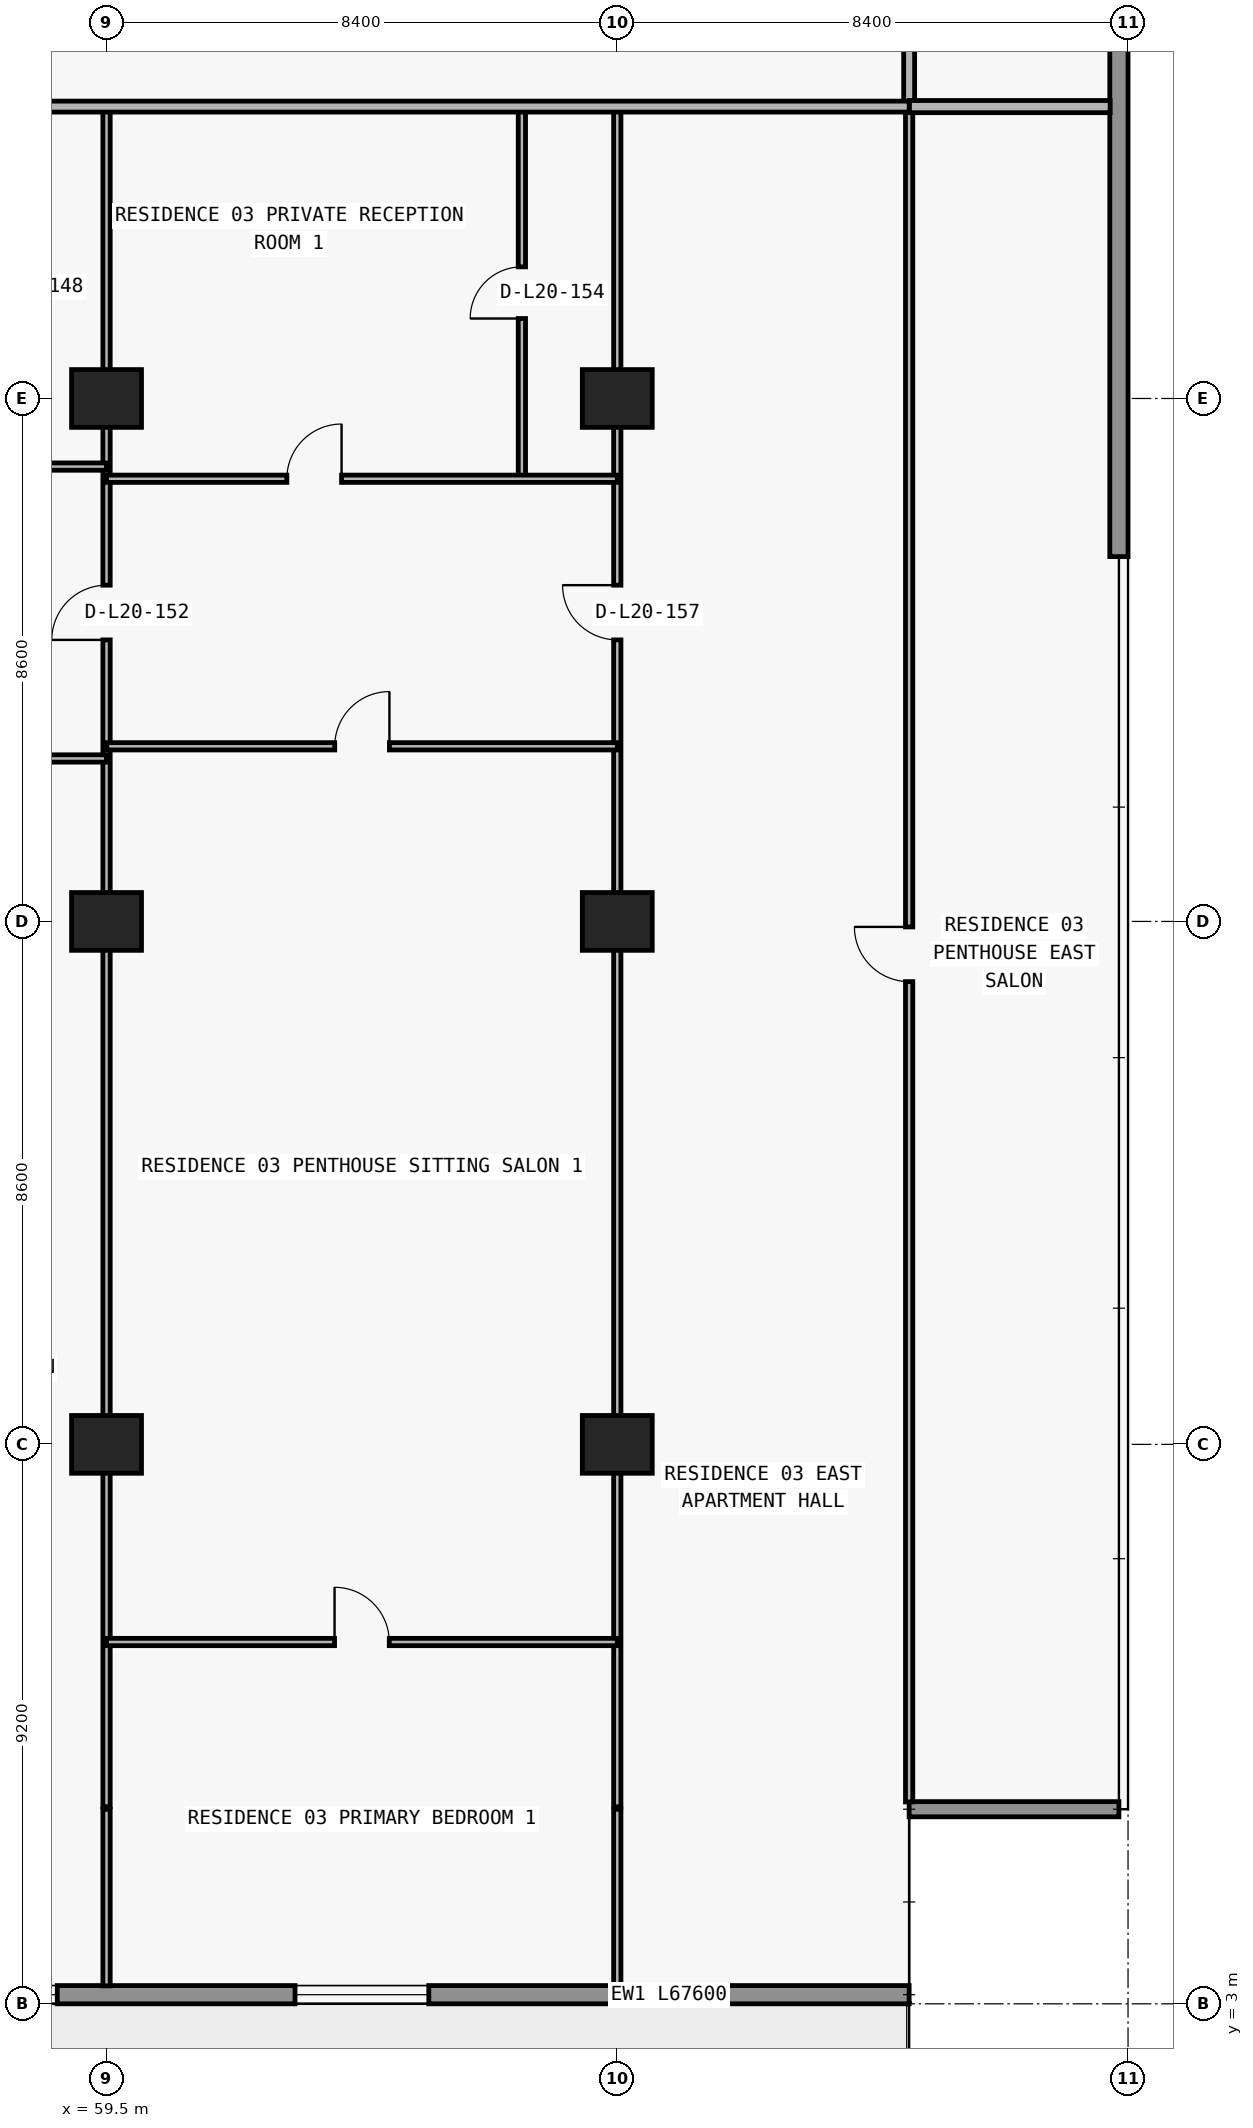
"""IFC4 building model, lengths in metres.
Left out: names, types, materials, properties, quantities, classifications, styles, units other than length and angle.
Written with IfcOpenShell. Run it as: python <this file> out.ifc"""

import sys

from ifc_helpers import new_model, si_unit, direction, frame, frame_2d, origin, origin_2d, place, context, subcontext, project, spatial, rectangle, extrude, element, fill, save


model = new_model("IFC4")
c1 = context("Model", 3, precision=1e-05, world=origin(), true_north=direction((0.0, 1.0)))
c2 = subcontext(c1, "Body", "Model", "MODEL_VIEW")
j1 = project(units=[si_unit("LENGTHUNIT", "METRE"), si_unit("PLANEANGLEUNIT", "RADIAN")], contexts=[c1])
p1 = place(None, origin())
s1 = spatial("IfcSite", under=j1, at=p1, CompositionType="ELEMENT")
p2 = place(p1, origin())
s2 = spatial("IfcBuilding", under=s1, at=p2, CompositionType="ELEMENT")
p3 = place(p2, frame((0.0, 0.0, 76.2)))
s3 = spatial("IfcBuildingStorey", under=s2, at=p3, CompositionType="ELEMENT", Elevation=76.2)
for number, where, z_axis, x_axis in (
    (1, (59.5, 12.2, 0.0), (0.0, 0.0, 1.0), (1.0, 0.0, 0.0)),
    (2, (67.9, 12.2, 0.0), (0.0, 0.0, 1.0), (1.0, 0.0, 0.0)),
    (3, (59.5, 20.8, 0.0), (0.0, 0.0, 1.0), (1.0, 0.0, 0.0)),
    (4, (67.9, 20.8, 0.0), (0.0, 0.0, 1.0), (1.0, 0.0, 0.0)),
    (5, (59.5, 29.4, 0.0), (0.0, 0.0, 1.0), (1.0, 0.0, 0.0)),
    (6, (67.9, 29.4, 0.0), (0.0, 0.0, 1.0), (1.0, 0.0, 0.0)),
):
    element("IfcColumn", number, at=place(p3, frame(where, z_axis=z_axis, x_axis=x_axis)), inside=s3, PredefinedType="COLUMN", context=c2, shape_type="SweptSolid", body=[
        extrude(rectangle(XDim=1.15, YDim=0.95, at=origin_2d()), origin(), (0.0, 0.0, 1.0), 3.0),
    ])
p4 = place(p3, frame((72.7, 3.15, 0.0), z_axis=(0.0, 0.0, 1.0), x_axis=(-1.0, 0.0, 0.0)))
e7 = element("IfcWall", 7, at=p4, inside=s3, PredefinedType="STANDARD", context=c2, shape_type="SweptSolid", body=[
    extrude(rectangle(XDim=67.6, YDim=0.3, at=frame_2d((33.8, 0.0))), origin(), (0.0, 0.0, 1.0), 3.0),
])
p5 = place(p4, frame((59.89, 0.0, 0.0)))
e8 = element("IfcOpeningElement", 8, at=p5, cuts=e7, PredefinedType="OPENING", context=c2, shape_type="SweptSolid", body=[
    extrude(rectangle(XDim=2.0, YDim=2.3, at=frame_2d((1.0, 1.15))), frame((0.0, 0.16, 0.0), z_axis=(0.0, -1.0, 0.0), x_axis=(1.0, 0.0, 0.0)), (0.0, 0.0, 1.0), 0.32),
])
p6 = place(p4, frame((55.21, 0.0, 0.65)))
e9 = element("IfcOpeningElement", 9, at=p6, cuts=e7, PredefinedType="OPENING", context=c2, shape_type="SweptSolid", body=[
    extrude(rectangle(XDim=2.6, YDim=1.85, at=frame_2d((1.3, 0.925))), frame((0.0, 0.16, 0.0), z_axis=(0.0, -1.0, 0.0), x_axis=(1.0, 0.0, 0.0)), (0.0, 0.0, 1.0), 0.32),
])
p7 = place(p4, frame((49.1, 0.0, 0.85)))
e10 = element("IfcOpeningElement", 10, at=p7, cuts=e7, PredefinedType="OPENING", context=c2, shape_type="SweptSolid", body=[
    extrude(rectangle(XDim=2.2, YDim=1.55, at=frame_2d((1.1, 0.775))), frame((0.0, 0.16, 0.0), z_axis=(0.0, -1.0, 0.0), x_axis=(1.0, 0.0, 0.0)), (0.0, 0.0, 1.0), 0.32),
])
p8 = place(p4, frame((43.09, 0.0, 0.0)))
e11 = element("IfcOpeningElement", 11, at=p8, cuts=e7, PredefinedType="OPENING", context=c2, shape_type="SweptSolid", body=[
    extrude(rectangle(XDim=2.0, YDim=2.3, at=frame_2d((1.0, 1.15))), frame((0.0, 0.16, 0.0), z_axis=(0.0, -1.0, 0.0), x_axis=(1.0, 0.0, 0.0)), (0.0, 0.0, 1.0), 0.32),
])
p9 = place(p4, frame((38.41, 0.0, 0.65)))
e12 = element("IfcOpeningElement", 12, at=p9, cuts=e7, PredefinedType="OPENING", context=c2, shape_type="SweptSolid", body=[
    extrude(rectangle(XDim=2.6, YDim=1.85, at=frame_2d((1.3, 0.925))), frame((0.0, 0.16, 0.0), z_axis=(0.0, -1.0, 0.0), x_axis=(1.0, 0.0, 0.0)), (0.0, 0.0, 1.0), 0.32),
])
p10 = place(p4, frame((32.7, 0.0, 0.85)))
e13 = element("IfcOpeningElement", 13, at=p10, cuts=e7, PredefinedType="OPENING", context=c2, shape_type="SweptSolid", body=[
    extrude(rectangle(XDim=2.2, YDim=1.55, at=frame_2d((1.1, 0.775))), frame((0.0, 0.16, 0.0), z_axis=(0.0, -1.0, 0.0), x_axis=(1.0, 0.0, 0.0)), (0.0, 0.0, 1.0), 0.32),
])
p11 = place(p4, frame((24.7, 0.0, 0.85)))
e14 = element("IfcOpeningElement", 14, at=p11, cuts=e7, PredefinedType="OPENING", context=c2, shape_type="SweptSolid", body=[
    extrude(rectangle(XDim=2.2, YDim=1.55, at=frame_2d((1.1, 0.775))), frame((0.0, 0.16, 0.0), z_axis=(0.0, -1.0, 0.0), x_axis=(1.0, 0.0, 0.0)), (0.0, 0.0, 1.0), 0.32),
])
p12 = place(p4, frame((18.69, 0.0, 0.0)))
e15 = element("IfcOpeningElement", 15, at=p12, cuts=e7, PredefinedType="OPENING", context=c2, shape_type="SweptSolid", body=[
    extrude(rectangle(XDim=2.0, YDim=2.3, at=frame_2d((1.0, 1.15))), frame((0.0, 0.16, 0.0), z_axis=(0.0, -1.0, 0.0), x_axis=(1.0, 0.0, 0.0)), (0.0, 0.0, 1.0), 0.32),
])
p13 = place(p4, frame((14.01, 0.0, 0.65)))
e16 = element("IfcOpeningElement", 16, at=p13, cuts=e7, PredefinedType="OPENING", context=c2, shape_type="SweptSolid", body=[
    extrude(rectangle(XDim=2.6, YDim=1.85, at=frame_2d((1.3, 0.925))), frame((0.0, 0.16, 0.0), z_axis=(0.0, -1.0, 0.0), x_axis=(1.0, 0.0, 0.0)), (0.0, 0.0, 1.0), 0.32),
])
p14 = place(p4, frame((7.9, 0.0, 0.85)))
e17 = element("IfcOpeningElement", 17, at=p14, cuts=e7, PredefinedType="OPENING", context=c2, shape_type="SweptSolid", body=[
    extrude(rectangle(XDim=2.2, YDim=1.55, at=frame_2d((1.1, 0.775))), frame((0.0, 0.16, 0.0), z_axis=(0.0, -1.0, 0.0), x_axis=(1.0, 0.0, 0.0)), (0.0, 0.0, 1.0), 0.32),
])
p15 = place(p3, frame((72.7, 6.2, 0.0), z_axis=(0.0, 0.0, 1.0), x_axis=(1.0, 0.0, 0.0)))
e18 = element("IfcWall", 18, at=p15, inside=s3, PredefinedType="ELEMENTEDWALL", context=c2, shape_type="SweptSolid", body=[
    extrude(rectangle(XDim=3.45, YDim=0.25, at=frame_2d((1.725, 0.0))), origin(), (0.0, 0.0, 1.0), 3.0),
])
p16 = place(p3, frame((76.15, 47.4, 0.0), z_axis=(0.0, 0.0, 1.0), x_axis=(0.0, -1.0, 0.0)))
e19 = element("IfcWall", 19, at=p16, inside=s3, PredefinedType="STANDARD", context=c2, shape_type="SweptSolid", body=[
    extrude(rectangle(XDim=20.6, YDim=0.3, at=frame_2d((10.3, 0.0))), origin(), (0.0, 0.0, 1.0), 3.0),
])
p17 = place(p3, frame((59.5, 3.295, 0.0), z_axis=(0.0, 0.0, 1.0), x_axis=(0.0, 1.0, 0.0)))
e20 = element("IfcWall", 20, at=p17, inside=s3, PredefinedType="PARTITIONING", context=c2, shape_type="SweptSolid", body=[
    extrude(rectangle(XDim=2.905, YDim=0.12, at=frame_2d((1.453, 0.0))), origin(), (0.0, 0.0, 1.0), 3.0),
])
p18 = place(p3, frame((59.5, 6.24, 0.0), z_axis=(0.0, 0.0, 1.0), x_axis=(0.0, 1.0, 0.0)))
e21 = element("IfcWall", 21, at=p18, inside=s3, PredefinedType="PARTITIONING", context=c2, shape_type="SweptSolid", body=[
    extrude(rectangle(XDim=27.96, YDim=0.12, at=frame_2d((13.98, 0.0))), origin(), (0.0, 0.0, 1.0), 2.06),
])
p19 = place(p18, frame((19.19, 0.0, 0.0)))
e22 = element("IfcOpeningElement", 22, at=p19, cuts=e21, PredefinedType="OPENING", context=c2, shape_type="SweptSolid", body=[
    extrude(rectangle(XDim=0.9, YDim=2.01, at=frame_2d((0.45, 1.005))), frame((0.0, 0.07, 0.0), z_axis=(0.0, -1.0, 0.0), x_axis=(1.0, 0.0, 0.0)), (0.0, 0.0, 1.0), 0.14),
])
p20 = place(p3, frame((66.331, 28.08, 0.0), z_axis=(0.0, 0.0, 1.0), x_axis=(0.0, 1.0, 0.0)))
e23 = element("IfcWall", 23, at=p20, inside=s3, PredefinedType="PARTITIONING", context=c2, shape_type="SweptSolid", body=[
    extrude(rectangle(XDim=6.12, YDim=0.12, at=frame_2d((3.06, 0.0))), origin(), (0.0, 0.0, 1.0), 3.0),
])
p21 = place(p20, frame((2.635, 0.0, 0.0)))
e24 = element("IfcOpeningElement", 24, at=p21, cuts=e23, PredefinedType="OPENING", context=c2, shape_type="SweptSolid", body=[
    extrude(rectangle(XDim=0.85, YDim=2.1, at=frame_2d((0.425, 1.05))), frame((0.0, 0.07, 0.0), z_axis=(0.0, -1.0, 0.0), x_axis=(1.0, 0.0, 0.0)), (0.0, 0.0, 1.0), 0.14),
])
p22 = place(p3, frame((67.9, 3.295, 0.0), z_axis=(0.0, 0.0, 1.0), x_axis=(0.0, 1.0, 0.0)))
e25 = element("IfcWall", 25, at=p22, inside=s3, PredefinedType="PARTITIONING", context=c2, shape_type="SweptSolid", body=[
    extrude(rectangle(XDim=2.905, YDim=0.12, at=frame_2d((1.453, 0.0))), origin(), (0.0, 0.0, 1.0), 3.0),
])
p23 = place(p3, frame((67.9, 6.24, 0.0), z_axis=(0.0, 0.0, 1.0), x_axis=(0.0, 1.0, 0.0)))
e26 = element("IfcWall", 26, at=p23, inside=s3, PredefinedType="PARTITIONING", context=c2, shape_type="SweptSolid", body=[
    extrude(rectangle(XDim=27.96, YDim=0.12, at=frame_2d((13.98, 0.0))), origin(), (0.0, 0.0, 1.0), 2.06),
])
p24 = place(p23, frame((19.19, 0.0, 0.0)))
e27 = element("IfcOpeningElement", 27, at=p24, cuts=e26, PredefinedType="OPENING", context=c2, shape_type="SweptSolid", body=[
    extrude(rectangle(XDim=0.9, YDim=2.01, at=frame_2d((0.45, 1.005))), frame((0.0, 0.07, 0.0), z_axis=(0.0, -1.0, 0.0), x_axis=(1.0, 0.0, 0.0)), (0.0, 0.0, 1.0), 0.14),
])
p25 = place(p3, frame((72.7, 6.32, 0.0), z_axis=(0.0, 0.0, 1.0), x_axis=(0.0, 1.0, 0.0)))
e28 = element("IfcWall", 28, at=p25, inside=s3, PredefinedType="PARTITIONING", context=c2, shape_type="SweptSolid", body=[
    extrude(rectangle(XDim=27.88, YDim=0.12, at=frame_2d((13.94, 0.0))), origin(), (0.0, 0.0, 1.0), 3.0),
])
p26 = place(p25, frame((13.49, 0.0, 0.0)))
e29 = element("IfcOpeningElement", 29, at=p26, cuts=e28, PredefinedType="OPENING", context=c2, shape_type="SweptSolid", body=[
    extrude(rectangle(XDim=0.9, YDim=2.15, at=frame_2d((0.45, 1.075))), frame((0.0, 0.07, 0.0), z_axis=(0.0, -1.0, 0.0), x_axis=(1.0, 0.0, 0.0)), (0.0, 0.0, 1.0), 0.14),
])
p27 = place(p3, frame((72.7, 34.205, 0.0), z_axis=(0.0, 0.0, 1.0), x_axis=(0.0, 1.0, 0.0)))
e30 = element("IfcWall", 30, at=p27, inside=s3, PredefinedType="PARTITIONING", context=c2, shape_type="SweptSolid", body=[
    extrude(rectangle(XDim=2.695, YDim=0.18, at=frame_2d((1.347, 0.0))), origin(), (0.0, 0.0, 1.0), 3.0),
])
p28 = place(p3, frame((59.5, 8.95, 0.0), z_axis=(0.0, 0.0, 1.0), x_axis=(1.0, 0.0, 0.0)))
e31 = element("IfcWall", 31, at=p28, inside=s3, PredefinedType="PARTITIONING", context=c2, shape_type="SweptSolid", body=[
    extrude(rectangle(XDim=8.4, YDim=0.12, at=frame_2d((4.2, 0.0))), origin(), (0.0, 0.0, 1.0), 3.0),
])
p29 = place(p28, frame((3.75, 0.0, 0.0)))
e32 = element("IfcOpeningElement", 32, at=p29, cuts=e31, PredefinedType="OPENING", context=c2, shape_type="SweptSolid", body=[
    extrude(rectangle(XDim=0.9, YDim=2.15, at=frame_2d((0.45, 1.075))), frame((0.0, 0.07, 0.0), z_axis=(0.0, -1.0, 0.0), x_axis=(1.0, 0.0, 0.0)), (0.0, 0.0, 1.0), 0.14),
])
p30 = place(p3, frame((51.37, 23.48, 0.0), z_axis=(0.0, 0.0, 1.0), x_axis=(1.0, 0.0, 0.0)))
e33 = element("IfcWall", 33, at=p30, inside=s3, PredefinedType="PARTITIONING", context=c2, shape_type="SweptSolid", body=[
    extrude(rectangle(XDim=8.13, YDim=0.12, at=frame_2d((4.065, 0.0))), origin(), (0.0, 0.0, 1.0), 3.0),
])
p31 = place(p30, frame((1.305, 0.0, 0.0)))
e34 = element("IfcOpeningElement", 34, at=p31, cuts=e33, PredefinedType="OPENING", context=c2, shape_type="SweptSolid", body=[
    extrude(rectangle(XDim=0.9, YDim=2.15, at=frame_2d((0.45, 1.075))), frame((0.0, 0.07, 0.0), z_axis=(0.0, -1.0, 0.0), x_axis=(1.0, 0.0, 0.0)), (0.0, 0.0, 1.0), 0.14),
])
p32 = place(p3, frame((59.505, 23.68, 0.0), z_axis=(0.0, 0.0, 1.0), x_axis=(1.0, 0.0, 0.0)))
e35 = element("IfcWall", 35, at=p32, inside=s3, PredefinedType="PARTITIONING", context=c2, shape_type="SweptSolid", body=[
    extrude(rectangle(XDim=8.395, YDim=0.12, at=frame_2d((4.198, 0.0))), origin(), (0.0, 0.0, 1.0), 3.0),
])
p33 = place(p32, frame((3.748, 0.0, 0.0)))
e36 = element("IfcOpeningElement", 36, at=p33, cuts=e35, PredefinedType="OPENING", context=c2, shape_type="SweptSolid", body=[
    extrude(rectangle(XDim=0.9, YDim=2.15, at=frame_2d((0.45, 1.075))), frame((0.0, 0.07, 0.0), z_axis=(0.0, -1.0, 0.0), x_axis=(1.0, 0.0, 0.0)), (0.0, 0.0, 1.0), 0.14),
])
p34 = place(p3, frame((59.5, 28.08, 0.0), z_axis=(0.0, 0.0, 1.0), x_axis=(1.0, 0.0, 0.0)))
e37 = element("IfcWall", 37, at=p34, inside=s3, PredefinedType="PARTITIONING", context=c2, shape_type="SweptSolid", body=[
    extrude(rectangle(XDim=8.4, YDim=0.12, at=frame_2d((4.2, 0.0))), origin(), (0.0, 0.0, 1.0), 3.0),
])
p35 = place(p34, frame((2.966, 0.0, 0.0)))
e38 = element("IfcOpeningElement", 38, at=p35, cuts=e37, PredefinedType="OPENING", context=c2, shape_type="SweptSolid", body=[
    extrude(rectangle(XDim=0.9, YDim=2.15, at=frame_2d((0.45, 1.075))), frame((0.0, 0.07, 0.0), z_axis=(0.0, -1.0, 0.0), x_axis=(1.0, 0.0, 0.0)), (0.0, 0.0, 1.0), 0.14),
])
p36 = place(p3, frame((51.37, 28.28, 0.0), z_axis=(0.0, 0.0, 1.0), x_axis=(1.0, 0.0, 0.0)))
e39 = element("IfcWall", 39, at=p36, inside=s3, PredefinedType="PARTITIONING", context=c2, shape_type="SweptSolid", body=[
    extrude(rectangle(XDim=8.13, YDim=0.12, at=frame_2d((4.065, 0.0))), origin(), (0.0, 0.0, 1.0), 3.0),
])
p37 = place(p36, frame((1.305, 0.0, 0.0)))
e40 = element("IfcOpeningElement", 40, at=p37, cuts=e39, PredefinedType="OPENING", context=c2, shape_type="SweptSolid", body=[
    extrude(rectangle(XDim=0.9, YDim=2.15, at=frame_2d((0.45, 1.075))), frame((0.0, 0.07, 0.0), z_axis=(0.0, -1.0, 0.0), x_axis=(1.0, 0.0, 0.0)), (0.0, 0.0, 1.0), 0.14),
])
p38 = place(p3, frame((5.105, 34.2, 0.0), z_axis=(0.0, 0.0, 1.0), x_axis=(1.0, 0.0, 0.0)))
e41 = element("IfcWall", 41, at=p38, inside=s3, PredefinedType="PARTITIONING", context=c2, shape_type="SweptSolid", body=[
    extrude(rectangle(XDim=67.595, YDim=0.18, at=frame_2d((33.797, 0.0))), origin(), (0.0, 0.0, 1.0), 3.0),
])
p39 = place(p38, frame((7.639, 0.0, 0.0)))
e42 = element("IfcOpeningElement", 42, at=p39, cuts=e41, PredefinedType="OPENING", context=c2, shape_type="SweptSolid", body=[
    extrude(rectangle(XDim=1.0, YDim=2.2, at=frame_2d((0.5, 1.1))), frame((0.0, 0.1, 0.0), z_axis=(0.0, -1.0, 0.0), x_axis=(1.0, 0.0, 0.0)), (0.0, 0.0, 1.0), 0.2),
])
p40 = place(p38, frame((24.423, 0.0, 0.0)))
e43 = element("IfcOpeningElement", 43, at=p40, cuts=e41, PredefinedType="OPENING", context=c2, shape_type="SweptSolid", body=[
    extrude(rectangle(XDim=1.0, YDim=2.2, at=frame_2d((0.5, 1.1))), frame((0.0, 0.1, 0.0), z_axis=(0.0, -1.0, 0.0), x_axis=(1.0, 0.0, 0.0)), (0.0, 0.0, 1.0), 0.2),
])
p41 = place(p38, frame((48.825, 0.0, 0.0)))
e44 = element("IfcOpeningElement", 44, at=p41, cuts=e41, PredefinedType="OPENING", context=c2, shape_type="SweptSolid", body=[
    extrude(rectangle(XDim=1.0, YDim=2.2, at=frame_2d((0.5, 1.1))), frame((0.0, 0.1, 0.0), z_axis=(0.0, -1.0, 0.0), x_axis=(1.0, 0.0, 0.0)), (0.0, 0.0, 1.0), 0.2),
])
p42 = place(p3, frame((72.705, 34.2, 0.0), z_axis=(0.0, 0.0, 1.0), x_axis=(1.0, 0.0, 0.0)))
e45 = element("IfcWall", 45, at=p42, inside=s3, PredefinedType="PARTITIONING", context=c2, shape_type="SweptSolid", body=[
    extrude(rectangle(XDim=3.3, YDim=0.2, at=frame_2d((1.65, 0.0))), origin(), (0.0, 0.0, 1.0), 3.0),
])
p43 = place(p13, origin())
e46 = element("IfcWindow", 46, at=p43, inside=s3, PartitioningType="SINGLE_PANEL", PredefinedType="WINDOW", context=c2, shape_type="SweptSolid", body=[
    extrude(rectangle(XDim=2.6, YDim=1.85, at=frame_2d((1.3, 0.925))), frame((0.0, 0.03, 0.0), z_axis=(0.0, -1.0, 0.0), x_axis=(1.0, 0.0, 0.0)), (0.0, 0.0, 1.0), 0.06),
])
fill(e16, e46)
p44 = place(p14, origin())
e47 = element("IfcWindow", 47, at=p44, inside=s3, PartitioningType="SINGLE_PANEL", PredefinedType="WINDOW", context=c2, shape_type="SweptSolid", body=[
    extrude(rectangle(XDim=2.2, YDim=1.55, at=frame_2d((1.1, 0.775))), frame((0.0, 0.03, 0.0), z_axis=(0.0, -1.0, 0.0), x_axis=(1.0, 0.0, 0.0)), (0.0, 0.0, 1.0), 0.06),
])
fill(e17, e47)
p45 = place(p19, origin())
e48 = element("IfcDoor", 48, at=p45, inside=s3, OperationType="SINGLE_SWING_LEFT", PredefinedType="DOOR", context=c2, shape_type="SweptSolid", body=[
    extrude(rectangle(XDim=0.9, YDim=2.01, at=frame_2d((0.45, 1.005))), frame((0.0, 0.025, 0.0), z_axis=(0.0, -1.0, 0.0), x_axis=(1.0, 0.0, 0.0)), (0.0, 0.0, 1.0), 0.05),
])
fill(e22, e48)
p46 = place(p35, origin())
e49 = element("IfcDoor", 49, at=p46, inside=s3, OperationType="SINGLE_SWING_RIGHT", PredefinedType="DOOR", context=c2, shape_type="SweptSolid", body=[
    extrude(rectangle(XDim=0.9, YDim=2.15, at=frame_2d((0.45, 1.075))), frame((0.0, 0.025, 0.0), z_axis=(0.0, -1.0, 0.0), x_axis=(1.0, 0.0, 0.0)), (0.0, 0.0, 1.0), 0.05),
])
fill(e38, e49)
p47 = place(p21, origin())
e50 = element("IfcDoor", 50, at=p47, inside=s3, OperationType="SINGLE_SWING_LEFT", PredefinedType="DOOR", context=c2, shape_type="SweptSolid", body=[
    extrude(rectangle(XDim=0.85, YDim=2.1, at=frame_2d((0.425, 1.05))), frame((0.0, 0.025, 0.0), z_axis=(0.0, -1.0, 0.0), x_axis=(1.0, 0.0, 0.0)), (0.0, 0.0, 1.0), 0.05),
])
fill(e24, e50)
p48 = place(p33, origin())
e51 = element("IfcDoor", 51, at=p48, inside=s3, OperationType="SINGLE_SWING_RIGHT", PredefinedType="DOOR", context=c2, shape_type="SweptSolid", body=[
    extrude(rectangle(XDim=0.9, YDim=2.15, at=frame_2d((0.45, 1.075))), frame((0.0, 0.025, 0.0), z_axis=(0.0, -1.0, 0.0), x_axis=(1.0, 0.0, 0.0)), (0.0, 0.0, 1.0), 0.05),
])
fill(e36, e51)
p49 = place(p29, origin())
e52 = element("IfcDoor", 52, at=p49, inside=s3, OperationType="SINGLE_SWING_LEFT", PredefinedType="DOOR", context=c2, shape_type="SweptSolid", body=[
    extrude(rectangle(XDim=0.9, YDim=2.15, at=frame_2d((0.45, 1.075))), frame((0.0, 0.025, 0.0), z_axis=(0.0, -1.0, 0.0), x_axis=(1.0, 0.0, 0.0)), (0.0, 0.0, 1.0), 0.05),
])
fill(e32, e52)
p50 = place(p24, origin())
e53 = element("IfcDoor", 53, at=p50, inside=s3, OperationType="SINGLE_SWING_RIGHT", PredefinedType="DOOR", context=c2, shape_type="SweptSolid", body=[
    extrude(rectangle(XDim=0.9, YDim=2.01, at=frame_2d((0.45, 1.005))), frame((0.0, 0.025, 0.0), z_axis=(0.0, -1.0, 0.0), x_axis=(1.0, 0.0, 0.0)), (0.0, 0.0, 1.0), 0.05),
])
fill(e27, e53)
p51 = place(p26, origin())
e54 = element("IfcDoor", 54, at=p51, inside=s3, OperationType="SINGLE_SWING_RIGHT", PredefinedType="DOOR", context=c2, shape_type="SweptSolid", body=[
    extrude(rectangle(XDim=0.9, YDim=2.15, at=frame_2d((0.45, 1.075))), frame((0.0, 0.025, 0.0), z_axis=(0.0, -1.0, 0.0), x_axis=(1.0, 0.0, 0.0)), (0.0, 0.0, 1.0), 0.05),
])
fill(e29, e54)
save(model, sys.argv[1])
